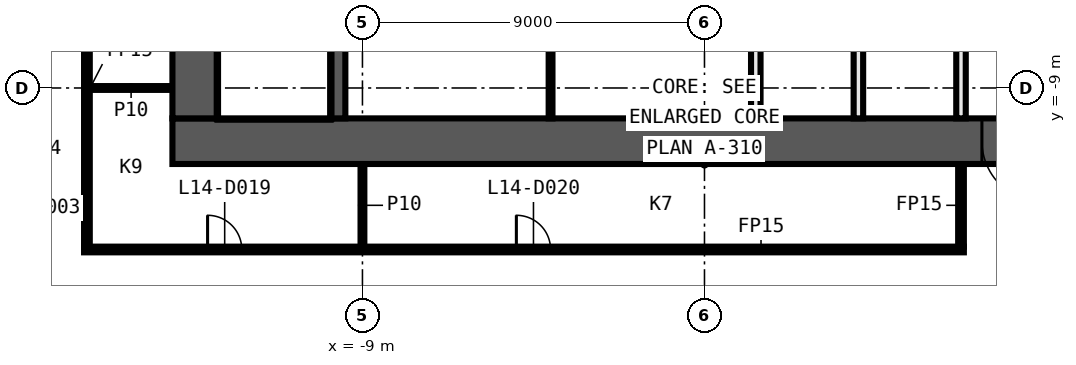
"""IFC4 building model, lengths in metres.
Left out: names, types, materials, properties, quantities, classifications, styles, units other than length and angle.
Written with IfcOpenShell. Run it as: python <this file> out.ifc"""

import sys

from ifc_helpers import new_model, si_unit, direction, frame, frame_2d, origin, place, context, subcontext, project, spatial, rectangle, extrude, element, fill, save


model = new_model("IFC4")
c1 = context("Model", 3, precision=1e-05, world=origin(), true_north=direction((0.0, 1.0)))
c2 = subcontext(c1, "Body", "Model", "MODEL_VIEW")
j1 = project(units=[si_unit("LENGTHUNIT", "METRE"), si_unit("PLANEANGLEUNIT", "RADIAN")], contexts=[c1])
p1 = place(None, origin())
s1 = spatial("IfcSite", under=j1, at=p1, CompositionType="ELEMENT")
p2 = place(p1, origin())
s2 = spatial("IfcBuilding", under=s1, at=p2, CompositionType="ELEMENT")
p3 = place(p2, frame((0.0, 0.0, 73.6)))
s3 = spatial("IfcBuildingStorey", under=s2, at=p3, CompositionType="ELEMENT", Elevation=73.6)
p4 = place(p3, frame((-16.325, -13.25, 0.0), z_axis=(0.0, 0.0, 1.0), x_axis=(1.0, 0.0, 0.0)))
e1 = element("IfcWall", 1, at=p4, inside=s3, PredefinedType="PARTITIONING", context=c2, shape_type="SweptSolid", body=[
    extrude(rectangle(XDim=23.15, YDim=0.15, at=frame_2d((11.575, 0.0))), origin(), (0.0, 0.0, 1.0), 3.3),
])
p5 = place(p4, frame((3.25, 0.0, 0.0)))
e2 = element("IfcOpeningElement", 2, at=p5, cuts=e1, PredefinedType="OPENING", context=c2, shape_type="SweptSolid", body=[
    extrude(rectangle(XDim=0.9, YDim=2.1, at=frame_2d((0.45, 1.05))), frame((0.0, 0.085, 0.0), z_axis=(0.0, -1.0, 0.0), x_axis=(1.0, 0.0, 0.0)), (0.0, 0.0, 1.0), 0.17),
])
p6 = place(p4, frame((11.375, 0.0, 0.0)))
e3 = element("IfcOpeningElement", 3, at=p6, cuts=e1, PredefinedType="OPENING", context=c2, shape_type="SweptSolid", body=[
    extrude(rectangle(XDim=0.9, YDim=2.1, at=frame_2d((0.45, 1.05))), frame((0.0, 0.085, 0.0), z_axis=(0.0, -1.0, 0.0), x_axis=(1.0, 0.0, 0.0)), (0.0, 0.0, 1.0), 0.17),
])
p7 = place(p3, frame((-16.175, -9.0, 0.0), z_axis=(0.0, 0.0, 1.0), x_axis=(1.0, 0.0, 0.0)))
e4 = element("IfcWall", 4, at=p7, inside=s3, PredefinedType="PARTITIONING", context=c2, shape_type="SweptSolid", body=[
    extrude(rectangle(XDim=2.175, YDim=0.1, at=frame_2d((1.087, 0.0))), origin(), (0.0, 0.0, 1.0), 3.3),
])
p8 = place(p3, frame((6.75, -13.175, 0.0), z_axis=(0.0, 0.0, 1.0), x_axis=(0.0, 1.0, 0.0)))
e5 = element("IfcWall", 5, at=p8, inside=s3, PredefinedType="PARTITIONING", context=c2, shape_type="SweptSolid", body=[
    extrude(rectangle(XDim=2.175, YDim=0.15, at=frame_2d((1.087, 0.0))), origin(), (0.0, 0.0, 1.0), 3.3),
])
p9 = place(p3, frame((-9.0, -13.175, 0.0), z_axis=(0.0, 0.0, 1.0), x_axis=(0.0, 1.0, 0.0)))
e6 = element("IfcWall", 6, at=p9, inside=s3, PredefinedType="PARTITIONING", context=c2, shape_type="SweptSolid", body=[
    extrude(rectangle(XDim=2.175, YDim=0.1, at=frame_2d((1.087, 0.0))), origin(), (0.0, 0.0, 1.0), 3.3),
])
p10 = place(p3, frame((-16.25, 13.175, 0.0), z_axis=(0.0, 0.0, 1.0), x_axis=(0.0, -1.0, 0.0)))
e7 = element("IfcWall", 7, at=p10, inside=s3, PredefinedType="PARTITIONING", context=c2, shape_type="SweptSolid", body=[
    extrude(rectangle(XDim=26.35, YDim=0.15, at=frame_2d((13.175, 0.0))), origin(), (0.0, 0.0, 1.0), 3.3),
])
p11 = place(p10, frame((17.225, 0.0, 0.0)))
e8 = element("IfcOpeningElement", 8, at=p11, cuts=e7, PredefinedType="OPENING", context=c2, shape_type="SweptSolid", body=[
    extrude(rectangle(XDim=0.9, YDim=2.1, at=frame_2d((0.45, 1.05))), frame((0.0, 0.085, 0.0), z_axis=(0.0, -1.0, 0.0), x_axis=(1.0, 0.0, 0.0)), (0.0, 0.0, 1.0), 0.17),
])
p12 = place(p10, frame((8.225, 0.0, 0.0)))
e9 = element("IfcOpeningElement", 9, at=p12, cuts=e7, PredefinedType="OPENING", context=c2, shape_type="SweptSolid", body=[
    extrude(rectangle(XDim=0.9, YDim=2.1, at=frame_2d((0.45, 1.05))), frame((0.0, 0.085, 0.0), z_axis=(0.0, -1.0, 0.0), x_axis=(1.0, 0.0, 0.0)), (0.0, 0.0, 1.0), 0.17),
])
p13 = place(p3, frame((14.0, -10.4, 0.0), z_axis=(0.0, 0.0, 1.0), x_axis=(-1.0, 0.0, 0.0)))
e10 = element("IfcWall", 10, at=p13, inside=s3, PredefinedType="SHEAR", context=c2, shape_type="SweptSolid", body=[
    extrude(rectangle(XDim=28.0, YDim=1.2, at=frame_2d((14.0, 0.0))), origin(), (0.0, 0.0, 1.0), 3.3),
])
p14 = place(p13, frame((5.1, 0.0, 0.0)))
e11 = element("IfcOpeningElement", 11, at=p14, cuts=e10, PredefinedType="OPENING", context=c2, shape_type="SweptSolid", body=[
    extrude(rectangle(XDim=1.6, YDim=2.1, at=frame_2d((0.8, 1.05))), frame((0.0, 0.61, 0.0), z_axis=(0.0, -1.0, 0.0), x_axis=(1.0, 0.0, 0.0)), (0.0, 0.0, 1.0), 1.22),
])
p15 = place(p3, frame((-13.4, -9.8, 0.0), z_axis=(0.0, 0.0, 1.0), x_axis=(0.0, 1.0, 0.0)))
e12 = element("IfcWall", 12, at=p15, inside=s3, PredefinedType="SHEAR", context=c2, shape_type="SweptSolid", body=[
    extrude(rectangle(XDim=19.6, YDim=1.2, at=frame_2d((9.8, 0.0))), origin(), (0.0, 0.0, 1.0), 3.3),
])
p16 = place(p3, frame((-9.65, -9.8, 0.0), z_axis=(0.0, 0.0, 1.0), x_axis=(0.0, 1.0, 0.0)))
e13 = element("IfcWall", 13, at=p16, inside=s3, PredefinedType="SHEAR", context=c2, shape_type="SweptSolid", body=[
    extrude(rectangle(XDim=7.5, YDim=0.4, at=frame_2d((3.75, 0.0))), origin(), (0.0, 0.0, 1.0), 3.3),
])
p17 = place(p16, frame((5.1, 0.0, 0.0)))
e14 = element("IfcOpeningElement", 14, at=p17, cuts=e13, PredefinedType="OPENING", context=c2, shape_type="SweptSolid", body=[
    extrude(rectangle(XDim=1.2, YDim=2.1, at=frame_2d((0.6, 1.05))), frame((0.0, 0.21, 0.0), z_axis=(0.0, -1.0, 0.0), x_axis=(1.0, 0.0, 0.0)), (0.0, 0.0, 1.0), 0.42),
])
for number, where, z_axis, x_axis in (
    (15, (6.75, -9.8, 0.0), (0.0, 0.0, 1.0), (0.0, 1.0, 0.0)),
    (16, (4.05, -9.8, 0.0), (0.0, 0.0, 1.0), (0.0, 1.0, 0.0)),
    (17, (1.35, -9.8, 0.0), (0.0, 0.0, 1.0), (0.0, 1.0, 0.0)),
):
    element("IfcWall", number, at=place(p3, frame(where, z_axis=z_axis, x_axis=x_axis)), inside=s3, PredefinedType="SOLIDWALL", context=c2, shape_type="SweptSolid", body=[
        extrude(rectangle(XDim=2.725, YDim=0.25, at=frame_2d((1.363, 0.0))), origin(), (0.0, 0.0, 1.0), 3.3),
    ])
p18 = place(p3, frame((-4.05, -9.8, 0.0), z_axis=(0.0, 0.0, 1.0), x_axis=(0.0, 1.0, 0.0)))
e18 = element("IfcWall", 18, at=p18, inside=s3, PredefinedType="PARTITIONING", context=c2, shape_type="SweptSolid", body=[
    extrude(rectangle(XDim=2.725, YDim=0.1, at=frame_2d((1.363, 0.0))), origin(), (0.0, 0.0, 1.0), 3.3),
])
p19 = place(p5, origin())
e19 = element("IfcDoor", 19, at=p19, inside=s3, OperationType="SINGLE_SWING_LEFT", PredefinedType="DOOR", context=c2, shape_type="SweptSolid", body=[
    extrude(rectangle(XDim=0.9, YDim=2.1, at=frame_2d((0.45, 1.05))), frame((0.0, 0.025, 0.0), z_axis=(0.0, -1.0, 0.0), x_axis=(1.0, 0.0, 0.0)), (0.0, 0.0, 1.0), 0.05),
])
fill(e2, e19)
p20 = place(p6, origin())
e20 = element("IfcDoor", 20, at=p20, inside=s3, OperationType="SINGLE_SWING_RIGHT", PredefinedType="DOOR", context=c2, shape_type="SweptSolid", body=[
    extrude(rectangle(XDim=0.9, YDim=2.1, at=frame_2d((0.45, 1.05))), frame((0.0, 0.025, 0.0), z_axis=(0.0, -1.0, 0.0), x_axis=(1.0, 0.0, 0.0)), (0.0, 0.0, 1.0), 0.05),
])
fill(e3, e20)
p21 = place(p14, origin())
e21 = element("IfcDoor", 21, at=p21, inside=s3, OperationType="DOUBLE_DOOR_SINGLE_SWING", PredefinedType="DOOR", context=c2, shape_type="SweptSolid", body=[
    extrude(rectangle(XDim=1.6, YDim=2.1, at=frame_2d((0.8, 1.05))), frame((0.0, 0.025, 0.0), z_axis=(0.0, -1.0, 0.0), x_axis=(1.0, 0.0, 0.0)), (0.0, 0.0, 1.0), 0.05),
])
fill(e11, e21)
save(model, sys.argv[1])
